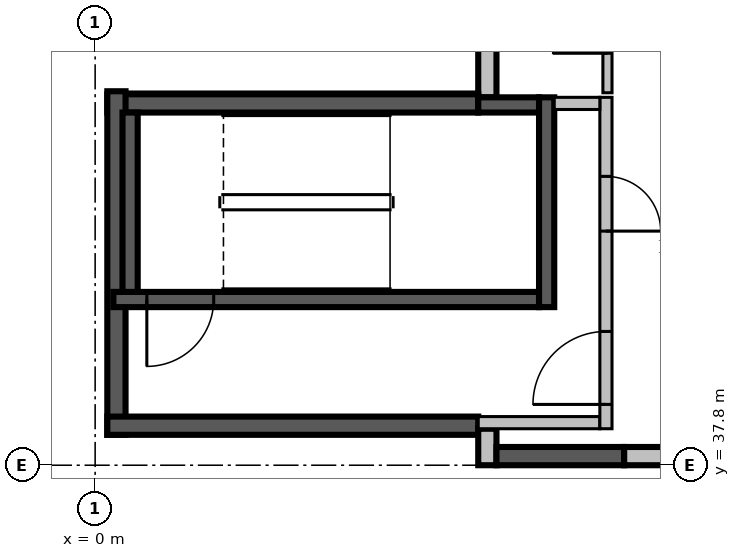
"""IFC4 building model, lengths in metres.
Left out: names, types, materials, properties, quantities, classifications, styles, units other than length and angle.
Written with IfcOpenShell. Run it as: python <this file> out.ifc"""

import sys

from ifc_helpers import new_model, si_unit, direction, frame, frame_2d, origin, place, context, subcontext, project, spatial, rectangle, extrude, source, transform, mapped, element, fill, save


model = new_model("IFC4")
c1 = context("Model", 3, precision=1e-05, world=origin(), true_north=direction((0.0, 1.0)))
c2 = subcontext(c1, "Body", "Model", "MODEL_VIEW")
j1 = project(units=[si_unit("LENGTHUNIT", "METRE"), si_unit("PLANEANGLEUNIT", "RADIAN")], contexts=[c1])
p1 = place(None, origin())
s1 = spatial("IfcSite", under=j1, at=p1, CompositionType="ELEMENT")
p2 = place(p1, origin())
s2 = spatial("IfcBuilding", under=s1, at=p2, CompositionType="ELEMENT")
p3 = place(p2, frame((0.0, 0.0, 132.9)))
s3 = spatial("IfcBuildingStorey", under=s2, at=p3, CompositionType="ELEMENT", Elevation=132.9)
m1 = source(origin(), c2, "Body", "SweptSolid", [
    extrude(rectangle(XDim=9.91, YDim=0.3, at=frame_2d((4.955, 0.0))), origin(), (0.0, 0.0, 1.0), 3.8),
])
p4 = place(p3, frame((6.45, 53.76, 0.0), z_axis=(0.0, 0.0, 1.0), x_axis=(0.0, -1.0, 0.0)))
e1 = element("IfcWall", 1, at=p4, inside=s3, PredefinedType="STANDARD", context=c2, shape_type="MappedRepresentation", body=[
    mapped(m1, transform((0.0, 0.0, 0.0), scale=1.0)),
])
m2 = source(origin(), c2, "Body", "SweptSolid", [
    extrude(rectangle(XDim=2.4, YDim=2.7, at=frame_2d((1.2, 1.35))), frame((0.0, 0.16, 0.0), z_axis=(0.0, -1.0, 0.0), x_axis=(1.0, 0.0, 0.0)), (0.0, 0.0, 1.0), 0.32),
])
p5 = place(p4, frame((4.272, 0.0, 0.6)))
e2 = element("IfcOpeningElement", 2, at=p5, cuts=e1, PredefinedType="OPENING", context=c2, shape_type="MappedRepresentation", body=[
    mapped(m2, transform((0.0, 0.0, 0.0), scale=1.0)),
])
p6 = place(p4, frame((0.936, 0.0, 0.6)))
e3 = element("IfcOpeningElement", 3, at=p6, cuts=e1, PredefinedType="OPENING", context=c2, shape_type="MappedRepresentation", body=[
    mapped(m2, transform((0.0, 0.0, 0.0), scale=1.0)),
])
m3 = source(origin(), c2, "Body", "SweptSolid", [
    extrude(rectangle(XDim=6.1, YDim=0.3, at=frame_2d((3.05, 0.0))), origin(), (0.0, 0.0, 1.0), 3.8),
])
p7 = place(p3, frame((6.3, 43.75, 0.0), z_axis=(0.0, 0.0, 1.0), x_axis=(-1.0, 0.0, 0.0)))
e4 = element("IfcWall", 4, at=p7, inside=s3, PredefinedType="SOLIDWALL", context=c2, shape_type="MappedRepresentation", body=[
    mapped(m3, transform((0.0, 0.0, 0.0), scale=1.0)),
])
m4 = source(origin(), c2, "Body", "SweptSolid", [
    extrude(rectangle(XDim=5.65, YDim=0.3, at=frame_2d((2.825, 0.0))), origin(), (0.0, 0.0, 1.0), 3.8),
])
p8 = place(p3, frame((0.35, 43.95, 0.0), z_axis=(0.0, 0.0, 1.0), x_axis=(0.0, -1.0, 0.0)))
e5 = element("IfcWall", 5, at=p8, inside=s3, PredefinedType="SOLIDWALL", context=c2, shape_type="MappedRepresentation", body=[
    mapped(m4, transform((0.0, 0.0, 0.0), scale=1.0)),
])
p9 = place(p3, frame((0.2, 38.45, 0.0), z_axis=(0.0, 0.0, 1.0), x_axis=(1.0, 0.0, 0.0)))
e6 = element("IfcWall", 6, at=p9, inside=s3, PredefinedType="SOLIDWALL", context=c2, shape_type="MappedRepresentation", body=[
    mapped(m3, transform((0.0, 0.0, 0.0), scale=1.0)),
])
m5 = source(origin(), c2, "Body", "SweptSolid", [
    extrude(rectangle(XDim=0.6, YDim=0.3, at=frame_2d((0.3, 0.0))), origin(), (0.0, 0.0, 1.0), 3.8),
])
p10 = place(p3, frame((6.45, 38.4, 0.0), z_axis=(0.0, 0.0, 1.0), x_axis=(0.0, -1.0, 0.0)))
e7 = element("IfcWall", 7, at=p10, inside=s3, PredefinedType="STANDARD", context=c2, shape_type="MappedRepresentation", body=[
    mapped(m5, transform((0.0, 0.0, 0.0), scale=1.0)),
])
m6 = source(origin(), c2, "Body", "SweptSolid", [
    extrude(rectangle(XDim=2.1, YDim=0.3, at=frame_2d((1.05, 0.0))), origin(), (0.0, 0.0, 1.0), 3.8),
])
p11 = place(p3, frame((6.6, 37.95, 0.0), z_axis=(0.0, 0.0, 1.0), x_axis=(1.0, 0.0, 0.0)))
e8 = element("IfcWall", 8, at=p11, inside=s3, PredefinedType="SOLIDWALL", context=c2, shape_type="MappedRepresentation", body=[
    mapped(m6, transform((0.0, 0.0, 0.0), scale=1.0)),
])
m7 = source(origin(), c2, "Body", "SweptSolid", [
    extrude(rectangle(XDim=1.275, YDim=0.3, at=frame_2d((0.637, 0.0))), origin(), (0.0, 0.0, 1.0), 3.8),
])
p12 = place(p3, frame((8.7, 37.95, 0.0), z_axis=(0.0, 0.0, 1.0), x_axis=(1.0, 0.0, 0.0)))
e9 = element("IfcWall", 9, at=p12, inside=s3, PredefinedType="STANDARD", context=c2, shape_type="MappedRepresentation", body=[
    mapped(m7, transform((0.0, 0.0, 0.0), scale=1.0)),
])
m8 = source(origin(), c2, "Body", "SweptSolid", [
    extrude(rectangle(XDim=7.0, YDim=0.25, at=frame_2d((3.5, 0.0))), origin(), (0.0, 0.0, 1.0), 3.8),
])
p13 = place(p3, frame((0.3, 40.525, 0.0), z_axis=(0.0, 0.0, 1.0), x_axis=(1.0, 0.0, 0.0)))
e10 = element("IfcWall", 10, at=p13, inside=s3, PredefinedType="SOLIDWALL", context=c2, shape_type="MappedRepresentation", body=[
    mapped(m8, transform((0.0, 0.0, 0.0), scale=1.0)),
])
m9 = source(origin(), c2, "Body", "SweptSolid", [
    extrude(rectangle(XDim=1.1, YDim=2.1, at=frame_2d((0.55, 1.05))), frame((0.0, 0.135, 0.0), z_axis=(0.0, -1.0, 0.0), x_axis=(1.0, 0.0, 0.0)), (0.0, 0.0, 1.0), 0.27),
])
p14 = place(p13, frame((0.55, 0.0, 0.0)))
e11 = element("IfcOpeningElement", 11, at=p14, cuts=e10, PredefinedType="OPENING", context=c2, shape_type="MappedRepresentation", body=[
    mapped(m9, transform((0.0, 0.0, 0.0), scale=1.0)),
])
m10 = source(origin(), c2, "Body", "SweptSolid", [
    extrude(rectangle(XDim=1.0, YDim=0.25, at=frame_2d((0.5, 0.0))), origin(), (0.0, 0.0, 1.0), 3.8),
])
p15 = place(p3, frame((6.3, 43.725, 0.0), z_axis=(0.0, 0.0, 1.0), x_axis=(1.0, 0.0, 0.0)))
e12 = element("IfcWall", 12, at=p15, inside=s3, PredefinedType="SOLIDWALL", context=c2, shape_type="MappedRepresentation", body=[
    mapped(m10, transform((0.0, 0.0, 0.0), scale=1.0)),
])
m11 = source(origin(), c2, "Body", "SweptSolid", [
    extrude(rectangle(XDim=3.45, YDim=0.25, at=frame_2d((1.725, 0.0))), origin(), (0.0, 0.0, 1.0), 3.8),
])
p16 = place(p3, frame((7.425, 40.4, 0.0), z_axis=(0.0, 0.0, 1.0), x_axis=(0.0, 1.0, 0.0)))
e13 = element("IfcWall", 13, at=p16, inside=s3, PredefinedType="SOLIDWALL", context=c2, shape_type="MappedRepresentation", body=[
    mapped(m11, transform((0.0, 0.0, 0.0), scale=1.0)),
])
m12 = source(origin(), c2, "Body", "SweptSolid", [
    extrude(rectangle(XDim=2.95, YDim=0.25, at=frame_2d((1.475, 0.0))), origin(), (0.0, 0.0, 1.0), 3.8),
])
p17 = place(p3, frame((0.575, 40.65, 0.0), z_axis=(0.0, 0.0, 1.0), x_axis=(0.0, 1.0, 0.0)))
e14 = element("IfcWall", 14, at=p17, inside=s3, PredefinedType="SOLIDWALL", context=c2, shape_type="MappedRepresentation", body=[
    mapped(m12, transform((0.0, 0.0, 0.0), scale=1.0)),
])
m13 = source(origin(), c2, "Body", "SweptSolid", [
    extrude(rectangle(XDim=2.0, YDim=0.2, at=frame_2d((1.0, 0.0))), origin(), (0.0, 0.0, 1.0), 3.8),
])
p18 = place(p3, frame((6.3, 38.5, 0.0), z_axis=(0.0, 0.0, 1.0), x_axis=(1.0, 0.0, 0.0)))
e15 = element("IfcWall", 15, at=p18, inside=s3, PredefinedType="PARTITIONING", context=c2, shape_type="MappedRepresentation", body=[
    mapped(m13, transform((0.0, 0.0, 0.0), scale=1.0)),
])
m14 = source(origin(), c2, "Body", "SweptSolid", [
    extrude(rectangle(XDim=5.45, YDim=0.2, at=frame_2d((2.725, 0.0))), origin(), (0.0, 0.0, 1.0), 3.8),
])
p19 = place(p3, frame((8.4, 38.4, 0.0), z_axis=(0.0, 0.0, 1.0), x_axis=(0.0, 1.0, 0.0)))
e16 = element("IfcWall", 16, at=p19, inside=s3, PredefinedType="PARTITIONING", context=c2, shape_type="MappedRepresentation", body=[
    mapped(m14, transform((0.0, 0.0, 0.0), scale=1.0)),
])
m15 = source(origin(), c2, "Body", "SweptSolid", [
    extrude(rectangle(XDim=1.2, YDim=2.1, at=frame_2d((0.6, 1.05))), frame((0.0, 0.11, 0.0), z_axis=(0.0, -1.0, 0.0), x_axis=(1.0, 0.0, 0.0)), (0.0, 0.0, 1.0), 0.22),
])
p20 = place(p19, frame((0.4, 0.0, 0.0)))
e17 = element("IfcOpeningElement", 17, at=p20, cuts=e16, PredefinedType="OPENING", context=c2, shape_type="MappedRepresentation", body=[
    mapped(m15, transform((0.0, 0.0, 0.0), scale=1.0)),
])
m16 = source(origin(), c2, "Body", "SweptSolid", [
    extrude(rectangle(XDim=0.9, YDim=2.1, at=frame_2d((0.45, 1.05))), frame((0.0, 0.11, 0.0), z_axis=(0.0, -1.0, 0.0), x_axis=(1.0, 0.0, 0.0)), (0.0, 0.0, 1.0), 0.22),
])
p21 = place(p19, frame((3.25, 0.0, 0.0)))
e18 = element("IfcOpeningElement", 18, at=p21, cuts=e16, PredefinedType="OPENING", context=c2, shape_type="MappedRepresentation", body=[
    mapped(m16, transform((0.0, 0.0, 0.0), scale=1.0)),
])
m17 = source(origin(), c2, "Body", "SweptSolid", [
    extrude(rectangle(XDim=0.75, YDim=0.2, at=frame_2d((0.375, 0.0))), origin(), (0.0, 0.0, 1.0), 3.8),
])
p22 = place(p3, frame((7.55, 43.75, 0.0), z_axis=(0.0, 0.0, 1.0), x_axis=(1.0, 0.0, 0.0)))
e19 = element("IfcWall", 19, at=p22, inside=s3, PredefinedType="PARTITIONING", context=c2, shape_type="MappedRepresentation", body=[
    mapped(m17, transform((0.0, 0.0, 0.0), scale=1.0)),
])
m18 = source(origin(), c2, "Body", "SweptSolid", [
    extrude(rectangle(XDim=2.2, YDim=0.15, at=frame_2d((1.1, 0.0))), origin(), (0.0, 0.0, 1.0), 3.8),
])
p23 = place(p3, frame((8.425, 43.925, 0.0), z_axis=(0.0, 0.0, 1.0), x_axis=(0.0, 1.0, 0.0)))
e20 = element("IfcWall", 20, at=p23, inside=s3, PredefinedType="PARTITIONING", context=c2, shape_type="MappedRepresentation", body=[
    mapped(m18, transform((0.0, 0.0, 0.0), scale=1.0)),
])
m19 = source(origin(), c2, "Body", "SweptSolid", [
    extrude(rectangle(XDim=0.9, YDim=2.1, at=frame_2d((0.45, 1.05))), frame((0.0, 0.085, 0.0), z_axis=(0.0, -1.0, 0.0), x_axis=(1.0, 0.0, 0.0)), (0.0, 0.0, 1.0), 0.17),
])
p24 = place(p23, frame((0.65, 0.0, 0.0)))
e21 = element("IfcOpeningElement", 21, at=p24, cuts=e20, PredefinedType="OPENING", context=c2, shape_type="MappedRepresentation", body=[
    mapped(m19, transform((0.0, 0.0, 0.0), scale=1.0)),
])
m20 = source(origin(), c2, "Body", "SweptSolid", [
    extrude(rectangle(XDim=1.1, YDim=2.1, at=frame_2d((0.55, 1.05))), frame((0.0, 0.025, 0.0), z_axis=(0.0, -1.0, 0.0), x_axis=(1.0, 0.0, 0.0)), (0.0, 0.0, 1.0), 0.05),
])
p25 = place(p14, origin())
e22 = element("IfcDoor", 22, at=p25, inside=s3, OperationType="SINGLE_SWING_RIGHT", PredefinedType="DOOR", context=c2, shape_type="MappedRepresentation", body=[
    mapped(m20, transform((0.0, 0.0, 0.0), scale=1.0)),
])
fill(e11, e22)
m21 = source(origin(), c2, "Body", "SweptSolid", [
    extrude(rectangle(XDim=1.2, YDim=2.1, at=frame_2d((0.6, 1.05))), frame((0.0, 0.025, 0.0), z_axis=(0.0, -1.0, 0.0), x_axis=(1.0, 0.0, 0.0)), (0.0, 0.0, 1.0), 0.05),
])
p26 = place(p20, origin())
e23 = element("IfcDoor", 23, at=p26, inside=s3, OperationType="SINGLE_SWING_LEFT", PredefinedType="DOOR", context=c2, shape_type="MappedRepresentation", body=[
    mapped(m21, transform((0.0, 0.0, 0.0), scale=1.0)),
])
fill(e17, e23)
m22 = source(origin(), c2, "Body", "SweptSolid", [
    extrude(rectangle(XDim=0.9, YDim=2.1, at=frame_2d((0.45, 1.05))), frame((0.0, 0.025, 0.0), z_axis=(0.0, -1.0, 0.0), x_axis=(1.0, 0.0, 0.0)), (0.0, 0.0, 1.0), 0.05),
])
p27 = place(p21, origin())
e24 = element("IfcDoor", 24, at=p27, inside=s3, OperationType="SINGLE_SWING_RIGHT", PredefinedType="DOOR", context=c2, shape_type="MappedRepresentation", body=[
    mapped(m22, transform((0.0, 0.0, 0.0), scale=1.0)),
])
fill(e18, e24)
p28 = place(p24, origin())
e25 = element("IfcDoor", 25, at=p28, inside=s3, OperationType="SINGLE_SWING_LEFT", PredefinedType="DOOR", context=c2, shape_type="MappedRepresentation", body=[
    mapped(m22, transform((0.0, 0.0, 0.0), scale=1.0)),
])
fill(e21, e25)
save(model, sys.argv[1])
